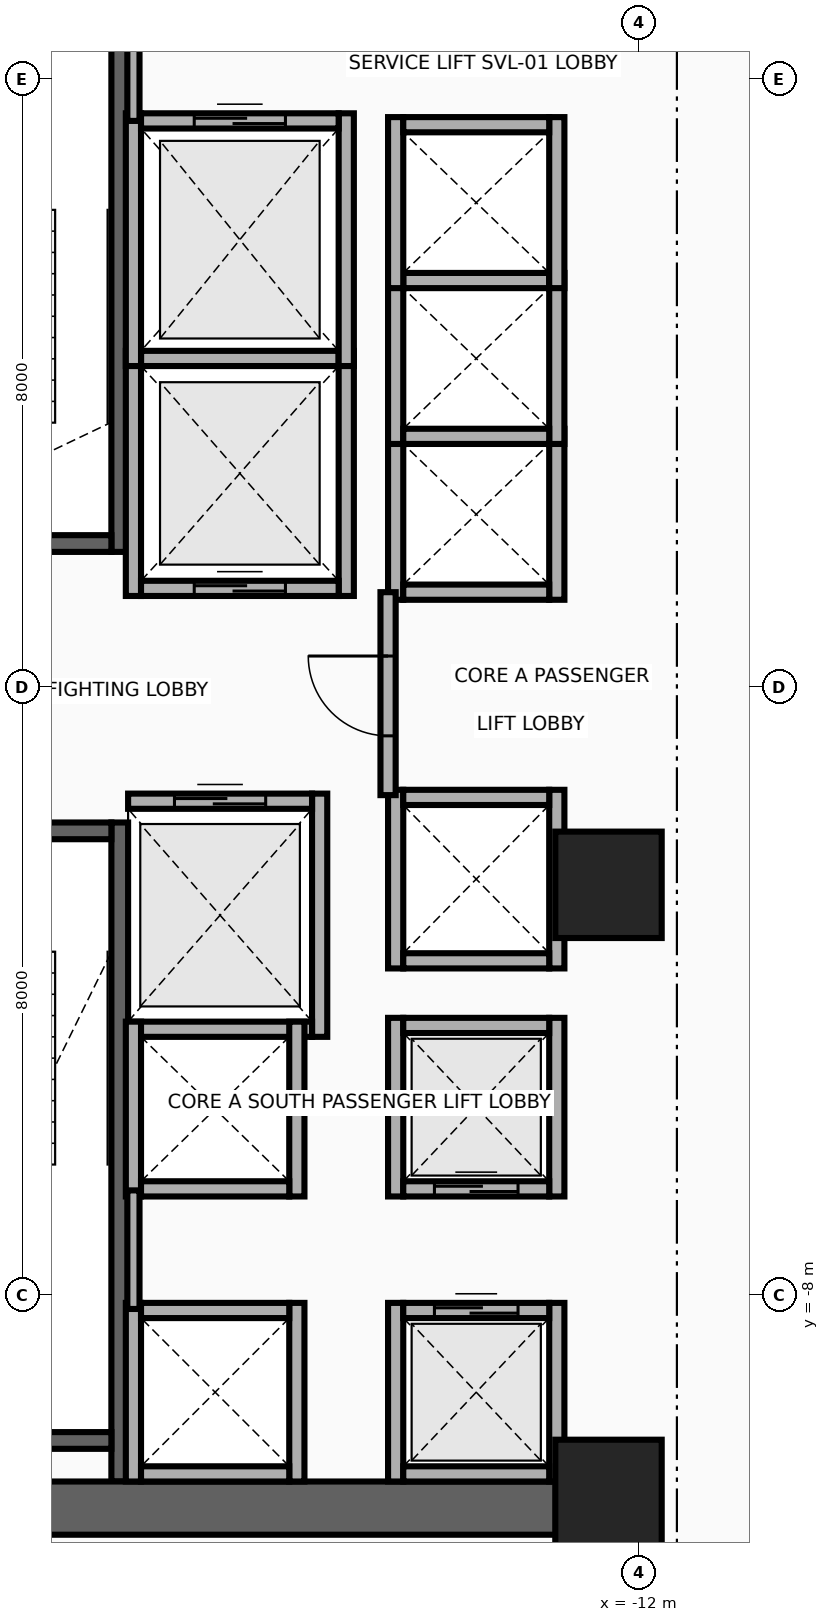
"""IFC4 building model, lengths in metres.
Left out: names, types, materials, properties, quantities, classifications, styles, units other than length and angle.
Written with IfcOpenShell. Run it as: python <this file> out.ifc"""

import sys

from ifc_helpers import new_model, si_unit, direction, frame, frame_2d, origin, origin_2d, place, context, subcontext, project, spatial, rectangle, extrude, source, transform, mapped, element, fill, save


model = new_model("IFC4")
c1 = context("Model", 3, precision=1e-05, world=origin(), true_north=direction((0.0, 1.0)))
c2 = subcontext(c1, "Body", "Model", "MODEL_VIEW")
j1 = project(units=[si_unit("LENGTHUNIT", "METRE"), si_unit("PLANEANGLEUNIT", "RADIAN")], contexts=[c1])
p1 = place(None, origin())
s1 = spatial("IfcSite", under=j1, at=p1, CompositionType="ELEMENT")
p2 = place(p1, origin())
s2 = spatial("IfcBuilding", under=s1, at=p2, CompositionType="ELEMENT")
p3 = place(p2, frame((0.0, 0.0, 59.3)))
s3 = spatial("IfcBuildingStorey", under=s2, at=p3, CompositionType="ELEMENT", Elevation=59.3)
p4 = place(p3, frame((-18.83, 1.78, 0.0), z_axis=(0.0, 0.0, 1.0), x_axis=(0.0, 1.0, 0.0)))
e1 = element("IfcWall", 1, at=p4, inside=s3, PredefinedType="SHEAR", context=c2, shape_type="SweptSolid", body=[
    extrude(rectangle(XDim=8.67, YDim=0.22, at=frame_2d((4.335, 0.0))), origin(), (0.0, 0.0, 1.0), 3.46),
])
p5 = place(p3, frame((-22.05, 1.89, 0.0), z_axis=(0.0, 0.0, 1.0), x_axis=(1.0, 0.0, 0.0)))
e2 = element("IfcWall", 2, at=p5, inside=s3, PredefinedType="SHEAR", context=c2, shape_type="SweptSolid", body=[
    extrude(rectangle(XDim=3.11, YDim=0.22, at=frame_2d((1.555, 0.0))), origin(), (0.0, 0.0, 1.0), 3.46),
])
p6 = place(p5, frame((1.0, 0.0, 0.0)))
e3 = element("IfcOpeningElement", 3, at=p6, cuts=e2, PredefinedType="OPENING", context=c2, shape_type="SweptSolid", body=[
    extrude(rectangle(XDim=1.1, YDim=2.15, at=frame_2d((0.55, 1.075))), frame((0.0, 0.125, 0.0), z_axis=(0.0, -1.0, 0.0), x_axis=(1.0, 0.0, 0.0)), (0.0, 0.0, 1.0), 0.25),
])
p7 = place(p3, frame((-18.83, -10.45, 0.0), z_axis=(0.0, 0.0, 1.0), x_axis=(0.0, 1.0, 0.0)))
e4 = element("IfcWall", 4, at=p7, inside=s3, PredefinedType="SHEAR", context=c2, shape_type="SweptSolid", body=[
    extrude(rectangle(XDim=8.67, YDim=0.22, at=frame_2d((4.335, 0.0))), origin(), (0.0, 0.0, 1.0), 3.46),
])
p8 = place(p3, frame((-22.05, -9.91, 0.0), z_axis=(0.0, 0.0, 1.0), x_axis=(1.0, 0.0, 0.0)))
e5 = element("IfcWall", 5, at=p8, inside=s3, PredefinedType="SHEAR", context=c2, shape_type="SweptSolid", body=[
    extrude(rectangle(XDim=3.11, YDim=0.22, at=frame_2d((1.555, 0.0))), origin(), (0.0, 0.0, 1.0), 3.46),
])
p9 = place(p3, frame((-22.05, -1.89, 0.0), z_axis=(0.0, 0.0, 1.0), x_axis=(1.0, 0.0, 0.0)))
e6 = element("IfcWall", 6, at=p9, inside=s3, PredefinedType="SHEAR", context=c2, shape_type="SweptSolid", body=[
    extrude(rectangle(XDim=3.11, YDim=0.22, at=frame_2d((1.555, 0.0))), origin(), (0.0, 0.0, 1.0), 3.46),
])
p10 = place(p9, frame((1.0, 0.0, 0.0)))
e7 = element("IfcOpeningElement", 7, at=p10, cuts=e6, PredefinedType="OPENING", context=c2, shape_type="SweptSolid", body=[
    extrude(rectangle(XDim=1.1, YDim=2.15, at=frame_2d((0.55, 1.075))), frame((0.0, 0.125, 0.0), z_axis=(0.0, -1.0, 0.0), x_axis=(1.0, 0.0, 0.0)), (0.0, 0.0, 1.0), 0.25),
])
p11 = place(p3, frame((-22.65, -10.8, 0.0), z_axis=(0.0, 0.0, 1.0), x_axis=(1.0, 0.0, 0.0)))
e8 = element("IfcWall", 8, at=p11, inside=s3, PredefinedType="SHEAR", context=c2, shape_type="SweptSolid", body=[
    extrude(rectangle(XDim=10.25, YDim=0.7, at=frame_2d((5.125, 0.0))), origin(), (0.0, 0.0, 1.0), 3.46),
])
m1 = source(origin(), c2, "Body", "SweptSolid", [
    extrude(rectangle(XDim=1.4, YDim=1.4, at=origin_2d()), origin(), (0.0, 0.0, 1.0), 3.7),
])
for number, where, z_axis, x_axis in (
    (9, (-12.4, -10.6, 0.0), (0.0, 0.0, 1.0), (1.0, 0.0, 0.0)),
    (10, (-12.4, -2.6, 0.0), (0.0, 0.0, 1.0), (1.0, 0.0, 0.0)),
):
    element("IfcColumn", number, at=place(p3, frame(where, z_axis=z_axis, x_axis=x_axis)), inside=s3, PredefinedType="COLUMN", context=c2, shape_type="MappedRepresentation", body=[
        mapped(m1, transform((0.0, 0.0, 0.0), x_axis=(1.0, 0.0, 0.0), y_axis=(0.0, 1.0, 0.0), z_axis=(0.0, 0.0, 1.0), scale=1.0)),
    ])
for number, where, z_axis, x_axis in (
    (11, (-18.65, 1.2, 0.0), (0.0, 0.0, 1.0), (0.0, 1.0, 0.0)),
    (12, (-15.85, 1.2, 0.0), (0.0, 0.0, 1.0), (0.0, 1.0, 0.0)),
):
    element("IfcWall", number, at=place(p3, frame(where, z_axis=z_axis, x_axis=x_axis)), inside=s3, PredefinedType="MOVABLE", context=c2, shape_type="SweptSolid", body=[
        extrude(rectangle(XDim=3.225, YDim=0.2, at=frame_2d((1.613, 0.0))), origin(), (0.0, 0.0, 1.0), 3.46),
    ])
p12 = place(p3, frame((-18.55, 1.3, 0.0), z_axis=(0.0, 0.0, 1.0), x_axis=(1.0, 0.0, 0.0)))
e13 = element("IfcWall", 13, at=p12, inside=s3, PredefinedType="MOVABLE", context=c2, shape_type="SweptSolid", body=[
    extrude(rectangle(XDim=2.6, YDim=0.2, at=frame_2d((1.3, 0.0))), origin(), (0.0, 0.0, 1.0), 3.46),
])
p13 = place(p12, frame((0.7, 0.0, 0.0)))
e14 = element("IfcOpeningElement", 14, at=p13, cuts=e13, PredefinedType="OPENING", context=c2, shape_type="SweptSolid", body=[
    extrude(rectangle(XDim=1.2, YDim=2.1, at=frame_2d((0.6, 1.05))), frame((0.0, 0.115, 0.0), z_axis=(0.0, -1.0, 0.0), x_axis=(1.0, 0.0, 0.0)), (0.0, 0.0, 1.0), 0.23),
])
p14 = place(p3, frame((-18.55, 4.325, 0.0), z_axis=(0.0, 0.0, 1.0), x_axis=(1.0, 0.0, 0.0)))
e15 = element("IfcWall", 15, at=p14, inside=s3, PredefinedType="MOVABLE", context=c2, shape_type="SweptSolid", body=[
    extrude(rectangle(XDim=2.6, YDim=0.2, at=frame_2d((1.3, 0.0))), origin(), (0.0, 0.0, 1.0), 3.46),
])
p15 = place(p3, frame((-16.2, -4.6, 0.0), z_axis=(0.0, 0.0, 1.0), x_axis=(0.0, 1.0, 0.0)))
e16 = element("IfcWall", 16, at=p15, inside=s3, PredefinedType="MOVABLE", context=c2, shape_type="SweptSolid", body=[
    extrude(rectangle(XDim=3.2, YDim=0.2, at=frame_2d((1.6, 0.0))), origin(), (0.0, 0.0, 1.0), 3.46),
])
p16 = place(p3, frame((-18.72, -4.5, 0.0), z_axis=(0.0, 0.0, 1.0), x_axis=(1.0, 0.0, 0.0)))
e17 = element("IfcWall", 17, at=p16, inside=s3, PredefinedType="MOVABLE", context=c2, shape_type="SweptSolid", body=[
    extrude(rectangle(XDim=2.42, YDim=0.2, at=frame_2d((1.21, 0.0))), origin(), (0.0, 0.0, 1.0), 3.46),
])
p17 = place(p3, frame((-18.72, -1.5, 0.0), z_axis=(0.0, 0.0, 1.0), x_axis=(1.0, 0.0, 0.0)))
e18 = element("IfcWall", 18, at=p17, inside=s3, PredefinedType="MOVABLE", context=c2, shape_type="SweptSolid", body=[
    extrude(rectangle(XDim=2.42, YDim=0.2, at=frame_2d((1.21, 0.0))), origin(), (0.0, 0.0, 1.0), 3.46),
])
p18 = place(p17, frame((0.61, 0.0, 0.0)))
e19 = element("IfcOpeningElement", 19, at=p18, cuts=e18, PredefinedType="OPENING", context=c2, shape_type="SweptSolid", body=[
    extrude(rectangle(XDim=1.2, YDim=2.1, at=frame_2d((0.6, 1.05))), frame((0.0, 0.115, 0.0), z_axis=(0.0, -1.0, 0.0), x_axis=(1.0, 0.0, 0.0)), (0.0, 0.0, 1.0), 0.23),
])
for number, where, z_axis, x_axis in (
    (20, (-18.65, 4.225, 0.0), (0.0, 0.0, 1.0), (0.0, 1.0, 0.0)),
    (21, (-15.85, 4.225, 0.0), (0.0, 0.0, 1.0), (0.0, 1.0, 0.0)),
):
    element("IfcWall", number, at=place(p3, frame(where, z_axis=z_axis, x_axis=x_axis)), inside=s3, PredefinedType="MOVABLE", context=c2, shape_type="SweptSolid", body=[
        extrude(rectangle(XDim=3.325, YDim=0.2, at=frame_2d((1.663, 0.0))), origin(), (0.0, 0.0, 1.0), 3.46),
    ])
p19 = place(p3, frame((-18.55, 7.45, 0.0), z_axis=(0.0, 0.0, 1.0), x_axis=(1.0, 0.0, 0.0)))
e22 = element("IfcWall", 22, at=p19, inside=s3, PredefinedType="MOVABLE", context=c2, shape_type="SweptSolid", body=[
    extrude(rectangle(XDim=2.6, YDim=0.2, at=frame_2d((1.3, 0.0))), origin(), (0.0, 0.0, 1.0), 3.46),
])
p20 = place(p19, frame((0.7, 0.0, 0.0)))
e23 = element("IfcOpeningElement", 23, at=p20, cuts=e22, PredefinedType="OPENING", context=c2, shape_type="SweptSolid", body=[
    extrude(rectangle(XDim=1.2, YDim=2.1, at=frame_2d((0.6, 1.05))), frame((0.0, 0.115, 0.0), z_axis=(0.0, -1.0, 0.0), x_axis=(1.0, 0.0, 0.0)), (0.0, 0.0, 1.0), 0.23),
])
for number, where, z_axis, x_axis in (
    (24, (-15.2, -10.45, 0.0), (0.0, 0.0, 1.0), (0.0, 1.0, 0.0)),
    (25, (-13.08, -10.45, 0.0), (0.0, 0.0, 1.0), (0.0, 1.0, 0.0)),
):
    element("IfcWall", number, at=place(p3, frame(where, z_axis=z_axis, x_axis=x_axis)), inside=s3, PredefinedType="MOVABLE", context=c2, shape_type="SweptSolid", body=[
        extrude(rectangle(XDim=2.35, YDim=0.2, at=frame_2d((1.175, 0.0))), origin(), (0.0, 0.0, 1.0), 2.583),
    ])
p21 = place(p3, frame((-15.1, -10.35, 0.0), z_axis=(0.0, 0.0, 1.0), x_axis=(1.0, 0.0, 0.0)))
e26 = element("IfcWall", 26, at=p21, inside=s3, PredefinedType="MOVABLE", context=c2, shape_type="SweptSolid", body=[
    extrude(rectangle(XDim=1.92, YDim=0.2, at=frame_2d((0.96, 0.0))), origin(), (0.0, 0.0, 1.0), 2.583),
])
p22 = place(p3, frame((-15.1, -8.2, 0.0), z_axis=(0.0, 0.0, 1.0), x_axis=(1.0, 0.0, 0.0)))
e27 = element("IfcWall", 27, at=p22, inside=s3, PredefinedType="MOVABLE", context=c2, shape_type="SweptSolid", body=[
    extrude(rectangle(XDim=1.92, YDim=0.2, at=frame_2d((0.96, 0.0))), origin(), (0.0, 0.0, 1.0), 3.46),
])
p23 = place(p22, frame((0.41, 0.0, 0.0)))
e28 = element("IfcOpeningElement", 28, at=p23, cuts=e27, PredefinedType="OPENING", context=c2, shape_type="SweptSolid", body=[
    extrude(rectangle(XDim=1.1, YDim=2.1, at=frame_2d((0.55, 1.05))), frame((0.0, 0.115, 0.0), z_axis=(0.0, -1.0, 0.0), x_axis=(1.0, 0.0, 0.0)), (0.0, 0.0, 1.0), 0.23),
])
for number, where, z_axis, x_axis in (
    (29, (-15.2, -6.7, 0.0), (0.0, 0.0, 1.0), (0.0, 1.0, 0.0)),
    (30, (-13.08, -6.7, 0.0), (0.0, 0.0, 1.0), (0.0, 1.0, 0.0)),
):
    element("IfcWall", number, at=place(p3, frame(where, z_axis=z_axis, x_axis=x_axis)), inside=s3, PredefinedType="MOVABLE", context=c2, shape_type="SweptSolid", body=[
        extrude(rectangle(XDim=2.35, YDim=0.2, at=frame_2d((1.175, 0.0))), origin(), (0.0, 0.0, 1.0), 3.46),
    ])
p24 = place(p3, frame((-15.1, -6.6, 0.0), z_axis=(0.0, 0.0, 1.0), x_axis=(1.0, 0.0, 0.0)))
e31 = element("IfcWall", 31, at=p24, inside=s3, PredefinedType="MOVABLE", context=c2, shape_type="SweptSolid", body=[
    extrude(rectangle(XDim=1.92, YDim=0.2, at=frame_2d((0.96, 0.0))), origin(), (0.0, 0.0, 1.0), 3.46),
])
p25 = place(p24, frame((0.41, 0.0, 0.0)))
e32 = element("IfcOpeningElement", 32, at=p25, cuts=e31, PredefinedType="OPENING", context=c2, shape_type="SweptSolid", body=[
    extrude(rectangle(XDim=1.1, YDim=2.1, at=frame_2d((0.55, 1.05))), frame((0.0, 0.115, 0.0), z_axis=(0.0, -1.0, 0.0), x_axis=(1.0, 0.0, 0.0)), (0.0, 0.0, 1.0), 0.23),
])
p26 = place(p3, frame((-15.1, -4.45, 0.0), z_axis=(0.0, 0.0, 1.0), x_axis=(1.0, 0.0, 0.0)))
e33 = element("IfcWall", 33, at=p26, inside=s3, PredefinedType="MOVABLE", context=c2, shape_type="SweptSolid", body=[
    extrude(rectangle(XDim=1.92, YDim=0.2, at=frame_2d((0.96, 0.0))), origin(), (0.0, 0.0, 1.0), 3.46),
])
for number, where, z_axis, x_axis in (
    (34, (-18.65, -10.45, 0.0), (0.0, 0.0, 1.0), (0.0, 1.0, 0.0)),
    (35, (-16.5, -10.45, 0.0), (0.0, 0.0, 1.0), (0.0, 1.0, 0.0)),
):
    element("IfcWall", number, at=place(p3, frame(where, z_axis=z_axis, x_axis=x_axis)), inside=s3, PredefinedType="MOVABLE", context=c2, shape_type="SweptSolid", body=[
        extrude(rectangle(XDim=2.35, YDim=0.2, at=frame_2d((1.175, 0.0))), origin(), (0.0, 0.0, 1.0), 2.583),
    ])
p27 = place(p3, frame((-18.55, -10.35, 0.0), z_axis=(0.0, 0.0, 1.0), x_axis=(1.0, 0.0, 0.0)))
e36 = element("IfcWall", 36, at=p27, inside=s3, PredefinedType="MOVABLE", context=c2, shape_type="SweptSolid", body=[
    extrude(rectangle(XDim=1.95, YDim=0.2, at=frame_2d((0.975, 0.0))), origin(), (0.0, 0.0, 1.0), 2.583),
])
p28 = place(p3, frame((-18.55, -8.2, 0.0), z_axis=(0.0, 0.0, 1.0), x_axis=(1.0, 0.0, 0.0)))
e37 = element("IfcWall", 37, at=p28, inside=s3, PredefinedType="MOVABLE", context=c2, shape_type="SweptSolid", body=[
    extrude(rectangle(XDim=1.95, YDim=0.2, at=frame_2d((0.975, 0.0))), origin(), (0.0, 0.0, 1.0), 3.46),
])
for number, where, z_axis, x_axis in (
    (38, (-15.2, 1.15, 0.0), (0.0, 0.0, 1.0), (0.0, 1.0, 0.0)),
    (39, (-13.08, 1.15, 0.0), (0.0, 0.0, 1.0), (0.0, 1.0, 0.0)),
):
    element("IfcWall", number, at=place(p3, frame(where, z_axis=z_axis, x_axis=x_axis)), inside=s3, PredefinedType="MOVABLE", context=c2, shape_type="SweptSolid", body=[
        extrude(rectangle(XDim=2.25, YDim=0.2, at=frame_2d((1.125, 0.0))), origin(), (0.0, 0.0, 1.0), 3.46),
    ])
p29 = place(p3, frame((-15.1, 1.25, 0.0), z_axis=(0.0, 0.0, 1.0), x_axis=(1.0, 0.0, 0.0)))
e40 = element("IfcWall", 40, at=p29, inside=s3, PredefinedType="MOVABLE", context=c2, shape_type="SweptSolid", body=[
    extrude(rectangle(XDim=1.92, YDim=0.2, at=frame_2d((0.96, 0.0))), origin(), (0.0, 0.0, 1.0), 3.46),
])
for number, where, z_axis, x_axis in (
    (41, (-15.2, 3.2, 0.0), (0.0, 0.0, 1.0), (0.0, 1.0, 0.0)),
    (42, (-13.08, 3.2, 0.0), (0.0, 0.0, 1.0), (0.0, 1.0, 0.0)),
):
    element("IfcWall", number, at=place(p3, frame(where, z_axis=z_axis, x_axis=x_axis)), inside=s3, PredefinedType="MOVABLE", context=c2, shape_type="SweptSolid", body=[
        extrude(rectangle(XDim=2.25, YDim=0.2, at=frame_2d((1.125, 0.0))), origin(), (0.0, 0.0, 1.0), 3.46),
    ])
for number, where, z_axis, x_axis in (
    (43, (-15.1, 3.3, 0.0), (0.0, 0.0, 1.0), (1.0, 0.0, 0.0)),
    (44, (-15.1, 5.35, 0.0), (0.0, 0.0, 1.0), (1.0, 0.0, 0.0)),
):
    element("IfcWall", number, at=place(p3, frame(where, z_axis=z_axis, x_axis=x_axis)), inside=s3, PredefinedType="MOVABLE", context=c2, shape_type="SweptSolid", body=[
        extrude(rectangle(XDim=1.92, YDim=0.2, at=frame_2d((0.96, 0.0))), origin(), (0.0, 0.0, 1.0), 3.46),
    ])
for number, where, z_axis, x_axis in (
    (45, (-15.2, 5.25, 0.0), (0.0, 0.0, 1.0), (0.0, 1.0, 0.0)),
    (46, (-13.08, 5.25, 0.0), (0.0, 0.0, 1.0), (0.0, 1.0, 0.0)),
):
    element("IfcWall", number, at=place(p3, frame(where, z_axis=z_axis, x_axis=x_axis)), inside=s3, PredefinedType="MOVABLE", context=c2, shape_type="SweptSolid", body=[
        extrude(rectangle(XDim=2.25, YDim=0.2, at=frame_2d((1.125, 0.0))), origin(), (0.0, 0.0, 1.0), 3.46),
    ])
p30 = place(p3, frame((-15.1, 7.4, 0.0), z_axis=(0.0, 0.0, 1.0), x_axis=(1.0, 0.0, 0.0)))
e47 = element("IfcWall", 47, at=p30, inside=s3, PredefinedType="MOVABLE", context=c2, shape_type="SweptSolid", body=[
    extrude(rectangle(XDim=1.92, YDim=0.2, at=frame_2d((0.96, 0.0))), origin(), (0.0, 0.0, 1.0), 3.46),
])
for number, where, z_axis, x_axis in (
    (48, (-18.65, -6.7, 0.0), (0.0, 0.0, 1.0), (0.0, 1.0, 0.0)),
    (49, (-16.5, -6.7, 0.0), (0.0, 0.0, 1.0), (0.0, 1.0, 0.0)),
):
    element("IfcWall", number, at=place(p3, frame(where, z_axis=z_axis, x_axis=x_axis)), inside=s3, PredefinedType="MOVABLE", context=c2, shape_type="SweptSolid", body=[
        extrude(rectangle(XDim=2.3, YDim=0.2, at=frame_2d((1.15, 0.0))), origin(), (0.0, 0.0, 1.0), 3.46),
    ])
p31 = place(p3, frame((-18.55, -6.6, 0.0), z_axis=(0.0, 0.0, 1.0), x_axis=(1.0, 0.0, 0.0)))
e50 = element("IfcWall", 50, at=p31, inside=s3, PredefinedType="MOVABLE", context=c2, shape_type="SweptSolid", body=[
    extrude(rectangle(XDim=1.95, YDim=0.2, at=frame_2d((0.975, 0.0))), origin(), (0.0, 0.0, 1.0), 3.46),
])
for number, where, z_axis, x_axis in (
    (51, (-15.2, -3.7, 0.0), (0.0, 0.0, 1.0), (0.0, 1.0, 0.0)),
    (52, (-13.08, -3.7, 0.0), (0.0, 0.0, 1.0), (0.0, 1.0, 0.0)),
):
    element("IfcWall", number, at=place(p3, frame(where, z_axis=z_axis, x_axis=x_axis)), inside=s3, PredefinedType="MOVABLE", context=c2, shape_type="SweptSolid", body=[
        extrude(rectangle(XDim=2.35, YDim=0.2, at=frame_2d((1.175, 0.0))), origin(), (0.0, 0.0, 1.0), 3.46),
    ])
for number, where, z_axis, x_axis in (
    (53, (-15.1, -3.6, 0.0), (0.0, 0.0, 1.0), (1.0, 0.0, 0.0)),
    (54, (-15.1, -1.45, 0.0), (0.0, 0.0, 1.0), (1.0, 0.0, 0.0)),
):
    element("IfcWall", number, at=place(p3, frame(where, z_axis=z_axis, x_axis=x_axis)), inside=s3, PredefinedType="MOVABLE", context=c2, shape_type="SweptSolid", body=[
        extrude(rectangle(XDim=1.92, YDim=0.2, at=frame_2d((0.96, 0.0))), origin(), (0.0, 0.0, 1.0), 3.46),
    ])
p32 = place(p3, frame((-15.3, -1.42, 0.0), z_axis=(0.0, 0.0, 1.0), x_axis=(0.0, 1.0, 0.0)))
e55 = element("IfcWall", 55, at=p32, inside=s3, PredefinedType="PARTITIONING", context=c2, shape_type="SweptSolid", body=[
    extrude(rectangle(XDim=2.67, YDim=0.2, at=frame_2d((1.335, 0.0))), origin(), (0.0, 0.0, 1.0), 3.46),
])
p33 = place(p32, frame((0.78, 0.0, 0.0)))
e56 = element("IfcOpeningElement", 56, at=p33, cuts=e55, PredefinedType="OPENING", context=c2, shape_type="SweptSolid", body=[
    extrude(rectangle(XDim=1.05, YDim=2.15, at=frame_2d((0.525, 1.075))), frame((0.0, 0.115, 0.0), z_axis=(0.0, -1.0, 0.0), x_axis=(1.0, 0.0, 0.0)), (0.0, 0.0, 1.0), 0.23),
])
p34 = place(p3, frame((-18.65, 7.45, 0.0), z_axis=(0.0, 0.0, 1.0), x_axis=(0.0, 1.0, 0.0)))
e57 = element("IfcWall", 57, at=p34, inside=s3, PredefinedType="PARTITIONING", context=c2, shape_type="SweptSolid", body=[
    extrude(rectangle(XDim=2.93, YDim=0.16, at=frame_2d((1.465, 0.0))), origin(), (0.0, 0.0, 1.0), 3.46),
])
p35 = place(p3, frame((-18.65, -8.18, 0.0), z_axis=(0.0, 0.0, 1.0), x_axis=(0.0, 1.0, 0.0)))
e58 = element("IfcWall", 58, at=p35, inside=s3, PredefinedType="PARTITIONING", context=c2, shape_type="SweptSolid", body=[
    extrude(rectangle(XDim=1.56, YDim=0.16, at=frame_2d((0.78, 0.0))), origin(), (0.0, 0.0, 1.0), 3.46),
])
p36 = place(p13, origin())
e59 = element("IfcDoor", 59, at=p36, inside=s3, OperationType="DOUBLE_DOOR_SLIDING", PredefinedType="DOOR", context=c2, shape_type="SweptSolid", body=[
    extrude(rectangle(XDim=1.2, YDim=2.1, at=frame_2d((0.6, 1.05))), frame((0.0, 0.025, 0.0), z_axis=(0.0, -1.0, 0.0), x_axis=(1.0, 0.0, 0.0)), (0.0, 0.0, 1.0), 0.05),
])
fill(e14, e59)
p37 = place(p18, origin())
e60 = element("IfcDoor", 60, at=p37, inside=s3, OperationType="DOUBLE_DOOR_SLIDING", PredefinedType="DOOR", context=c2, shape_type="SweptSolid", body=[
    extrude(rectangle(XDim=1.2, YDim=2.1, at=frame_2d((0.6, 1.05))), frame((0.0, 0.025, 0.0), z_axis=(0.0, -1.0, 0.0), x_axis=(1.0, 0.0, 0.0)), (0.0, 0.0, 1.0), 0.05),
])
fill(e19, e60)
p38 = place(p20, origin())
e61 = element("IfcDoor", 61, at=p38, inside=s3, OperationType="DOUBLE_DOOR_SLIDING", PredefinedType="DOOR", context=c2, shape_type="SweptSolid", body=[
    extrude(rectangle(XDim=1.2, YDim=2.1, at=frame_2d((0.6, 1.05))), frame((0.0, 0.025, 0.0), z_axis=(0.0, -1.0, 0.0), x_axis=(1.0, 0.0, 0.0)), (0.0, 0.0, 1.0), 0.05),
])
fill(e23, e61)
p39 = place(p23, origin())
e62 = element("IfcDoor", 62, at=p39, inside=s3, OperationType="DOUBLE_DOOR_SLIDING", PredefinedType="DOOR", context=c2, shape_type="SweptSolid", body=[
    extrude(rectangle(XDim=1.1, YDim=2.1, at=frame_2d((0.55, 1.05))), frame((0.0, 0.025, 0.0), z_axis=(0.0, -1.0, 0.0), x_axis=(1.0, 0.0, 0.0)), (0.0, 0.0, 1.0), 0.05),
])
fill(e28, e62)
p40 = place(p25, origin())
e63 = element("IfcDoor", 63, at=p40, inside=s3, OperationType="DOUBLE_DOOR_SLIDING", PredefinedType="DOOR", context=c2, shape_type="SweptSolid", body=[
    extrude(rectangle(XDim=1.1, YDim=2.1, at=frame_2d((0.55, 1.05))), frame((0.0, 0.025, 0.0), z_axis=(0.0, -1.0, 0.0), x_axis=(1.0, 0.0, 0.0)), (0.0, 0.0, 1.0), 0.05),
])
fill(e32, e63)
p41 = place(p33, origin())
e64 = element("IfcDoor", 64, at=p41, inside=s3, OperationType="SINGLE_SWING_RIGHT", PredefinedType="DOOR", context=c2, shape_type="SweptSolid", body=[
    extrude(rectangle(XDim=1.05, YDim=2.15, at=frame_2d((0.525, 1.075))), frame((0.0, 0.025, 0.0), z_axis=(0.0, -1.0, 0.0), x_axis=(1.0, 0.0, 0.0)), (0.0, 0.0, 1.0), 0.05),
])
fill(e56, e64)
save(model, sys.argv[1])
